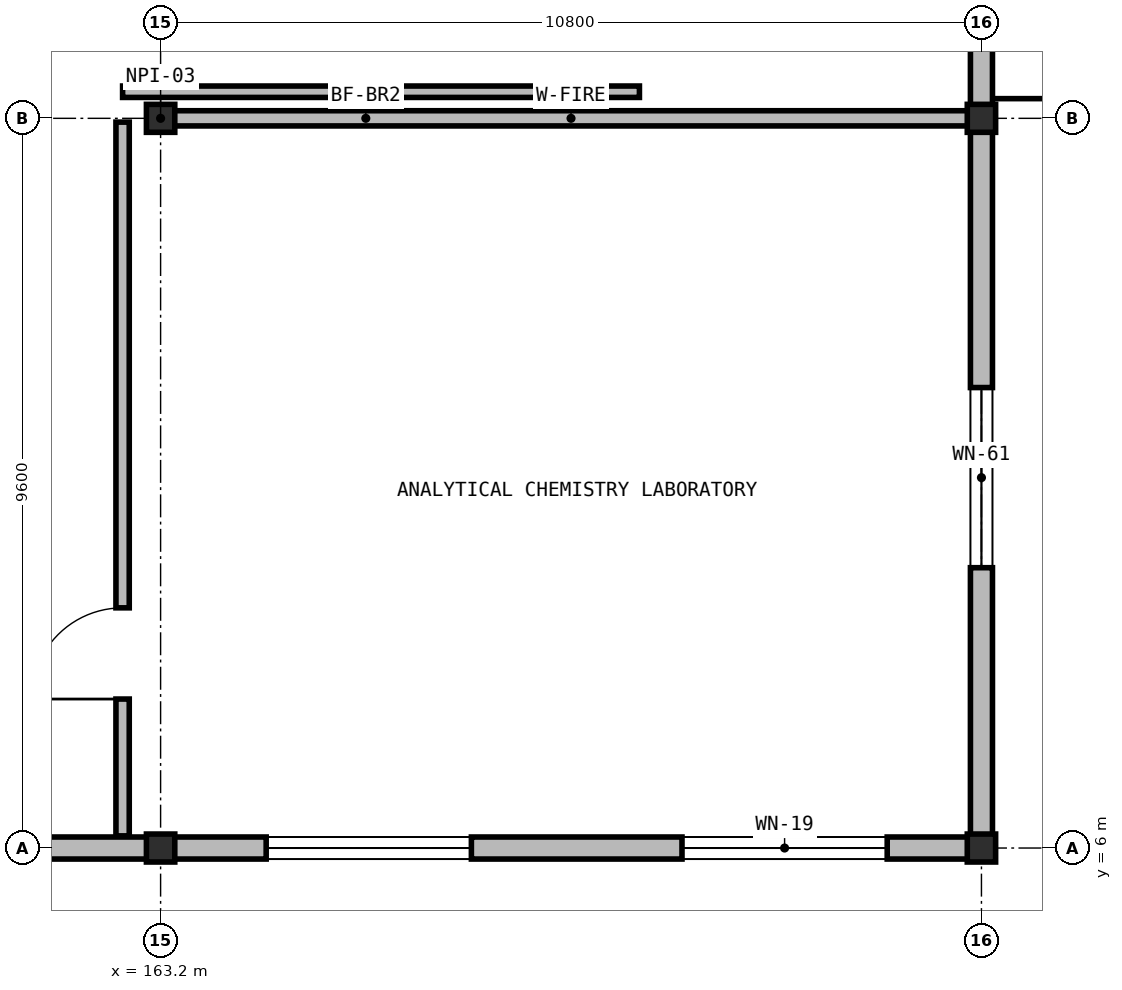
"""IFC4 building model, lengths in metres.
Left out: names, types, materials, properties, quantities, classifications, styles, units other than length and angle.
Written with IfcOpenShell. Run it as: python <this file> out.ifc"""

import sys

from ifc_helpers import new_model, si_unit, direction, frame, frame_2d, origin, origin_2d, place, context, subcontext, project, spatial, rectangle, i_section, extrude, element, fill, save


model = new_model("IFC4")
c1 = context("Model", 3, precision=1e-05, world=origin(), true_north=direction((0.0, 1.0)))
c2 = subcontext(c1, "Body", "Model", "MODEL_VIEW")
j1 = project(units=[si_unit("LENGTHUNIT", "METRE"), si_unit("PLANEANGLEUNIT", "RADIAN")], contexts=[c1])
p1 = place(None, origin())
s1 = spatial("IfcSite", under=j1, at=p1, CompositionType="ELEMENT")
p2 = place(p1, origin())
s2 = spatial("IfcBuilding", under=s1, at=p2, CompositionType="ELEMENT")
p3 = place(p2, frame((0.0, 0.0, 23.45)))
s3 = spatial("IfcBuildingStorey", under=s2, at=p3, CompositionType="ELEMENT", Elevation=23.45)
for number, where, z_axis, x_axis in (
    (1, (163.2, 6.0, 0.0), (0.0, 0.0, 1.0), (1.0, 0.0, 0.0)),
    (2, (163.2, 15.6, 0.0), (0.0, 0.0, 1.0), (1.0, 0.0, 0.0)),
    (3, (174.0, 6.0, 0.0), (0.0, 0.0, 1.0), (1.0, 0.0, 0.0)),
    (4, (174.0, 15.6, 0.0), (0.0, 0.0, 1.0), (1.0, 0.0, 0.0)),
):
    element("IfcColumn", number, at=place(p3, frame(where, z_axis=z_axis, x_axis=x_axis)), inside=s3, PredefinedType="COLUMN", context=c2, shape_type="SweptSolid", body=[
        extrude(i_section(OverallWidth=0.373, OverallDepth=0.368, WebThickness=0.017, FlangeThickness=0.027, at=origin_2d()), origin(), (0.0, 0.0, 1.0), 4.55),
    ])
p4 = place(p3, frame((174.0, 25.196, 0.0), z_axis=(0.0, 0.0, 1.0), x_axis=(0.0, -1.0, 0.0)))
e5 = element("IfcWall", 5, at=p4, inside=s3, PredefinedType="SOLIDWALL", context=c2, shape_type="SweptSolid", body=[
    extrude(rectangle(XDim=9.592, YDim=0.29, at=frame_2d((4.796, 0.0))), origin(), (0.0, 0.0, 1.0), 3.899),
])
p5 = place(p4, frame((3.776, 0.0, 0.95)))
e6 = element("IfcOpeningElement", 6, at=p5, cuts=e5, PredefinedType="OPENING", context=c2, shape_type="SweptSolid", body=[
    extrude(rectangle(XDim=2.04, YDim=1.56, at=frame_2d((1.02, 0.78))), frame((0.0, 0.155, 0.0), z_axis=(0.0, -1.0, 0.0), x_axis=(1.0, 0.0, 0.0)), (0.0, 0.0, 1.0), 0.31),
])
p6 = place(p3, frame((174.0, 15.596, 0.0), z_axis=(0.0, 0.0, 1.0), x_axis=(0.0, -1.0, 0.0)))
e7 = element("IfcWall", 7, at=p6, inside=s3, PredefinedType="SOLIDWALL", context=c2, shape_type="SweptSolid", body=[
    extrude(rectangle(XDim=9.447, YDim=0.29, at=frame_2d((4.724, 0.0))), origin(), (0.0, 0.0, 1.0), 3.899),
])
p7 = place(p6, frame((3.538, 0.0, 0.95)))
e8 = element("IfcOpeningElement", 8, at=p7, cuts=e7, PredefinedType="OPENING", context=c2, shape_type="SweptSolid", body=[
    extrude(rectangle(XDim=2.37, YDim=1.48, at=frame_2d((1.185, 0.74))), frame((0.0, 0.155, 0.0), z_axis=(0.0, -1.0, 0.0), x_axis=(1.0, 0.0, 0.0)), (0.0, 0.0, 1.0), 0.31),
])
p8 = place(p3, frame((174.145, 6.0, 0.0), z_axis=(0.0, 0.0, 1.0), x_axis=(-1.0, 0.0, 0.0)))
e9 = element("IfcWall", 9, at=p8, inside=s3, PredefinedType="SOLIDWALL", context=c2, shape_type="SweptSolid", body=[
    extrude(rectangle(XDim=10.941, YDim=0.29, at=frame_2d((5.47, 0.0))), origin(), (0.0, 0.0, 1.0), 3.831),
])
p9 = place(p8, frame((1.385, 0.0, 0.95)))
e10 = element("IfcOpeningElement", 10, at=p9, cuts=e9, PredefinedType="OPENING", context=c2, shape_type="SweptSolid", body=[
    extrude(rectangle(XDim=2.7, YDim=1.4, at=frame_2d((1.35, 0.7))), frame((0.0, 0.155, 0.0), z_axis=(0.0, -1.0, 0.0), x_axis=(1.0, 0.0, 0.0)), (0.0, 0.0, 1.0), 0.31),
])
p10 = place(p8, frame((6.856, 0.0, 0.95)))
e11 = element("IfcOpeningElement", 11, at=p10, cuts=e9, PredefinedType="OPENING", context=c2, shape_type="SweptSolid", body=[
    extrude(rectangle(XDim=2.7, YDim=1.4, at=frame_2d((1.35, 0.7))), frame((0.0, 0.155, 0.0), z_axis=(0.0, -1.0, 0.0), x_axis=(1.0, 0.0, 0.0)), (0.0, 0.0, 1.0), 0.31),
])
p11 = place(p3, frame((163.196, 6.0, 0.0), z_axis=(0.0, 0.0, 1.0), x_axis=(-1.0, 0.0, 0.0)))
e12 = element("IfcWall", 12, at=p11, inside=s3, PredefinedType="SOLIDWALL", context=c2, shape_type="SweptSolid", body=[
    extrude(rectangle(XDim=9.741, YDim=0.29, at=frame_2d((4.871, 0.0))), origin(), (0.0, 0.0, 1.0), 3.899),
])
p12 = place(p11, frame((6.506, 0.0, 0.95)))
e13 = element("IfcOpeningElement", 13, at=p12, cuts=e12, PredefinedType="OPENING", context=c2, shape_type="SweptSolid", body=[
    extrude(rectangle(XDim=1.6, YDim=1.72, at=frame_2d((0.8, 0.86))), frame((0.0, 0.155, 0.0), z_axis=(0.0, -1.0, 0.0), x_axis=(1.0, 0.0, 0.0)), (0.0, 0.0, 1.0), 0.31),
])
p13 = place(p3, frame((163.36, 15.6, 0.0), z_axis=(0.0, 0.0, 1.0), x_axis=(1.0, 0.0, 0.0)))
e14 = element("IfcWall", 14, at=p13, inside=s3, PredefinedType="SOLIDWALL", context=c2, shape_type="SweptSolid", body=[
    extrude(rectangle(XDim=10.48, YDim=0.2, at=frame_2d((5.24, 0.0))), origin(), (0.0, 0.0, 1.0), 3.754),
])
p14 = place(p3, frame((162.7, 6.16, 0.0), z_axis=(0.0, 0.0, 1.0), x_axis=(0.0, 1.0, 0.0)))
e15 = element("IfcWall", 15, at=p14, inside=s3, PredefinedType="PARTITIONING", context=c2, shape_type="SweptSolid", body=[
    extrude(rectangle(XDim=9.39, YDim=0.175, at=frame_2d((4.695, 0.0))), origin(), (0.0, 0.0, 1.0), 4.3),
])
p15 = place(p14, frame((1.8, 0.0, 0.0)))
e16 = element("IfcOpeningElement", 16, at=p15, cuts=e15, PredefinedType="OPENING", context=c2, shape_type="SweptSolid", body=[
    extrude(rectangle(XDim=1.2, YDim=2.2, at=frame_2d((0.6, 1.1))), frame((0.0, 0.097, 0.0), z_axis=(0.0, -1.0, 0.0), x_axis=(1.0, 0.0, 0.0)), (0.0, 0.0, 1.0), 0.195),
])
p16 = place(p3, frame((162.7, 15.95, 0.0), z_axis=(0.0, 0.0, 1.0), x_axis=(1.0, 0.0, 0.0)))
e17 = element("IfcWall", 17, at=p16, inside=s3, PredefinedType="PARTITIONING", context=c2, shape_type="SweptSolid", body=[
    extrude(rectangle(XDim=6.8, YDim=0.15, at=frame_2d((3.4, 0.0))), origin(), (0.0, 0.0, 1.0), 4.3),
])
p17 = place(p7, origin())
e18 = element("IfcWindow", 18, at=p17, inside=s3, PartitioningType="SINGLE_PANEL", PredefinedType="WINDOW", context=c2, shape_type="SweptSolid", body=[
    extrude(rectangle(XDim=2.37, YDim=1.48, at=frame_2d((1.185, 0.74))), frame((0.0, 0.03, 0.0), z_axis=(0.0, -1.0, 0.0), x_axis=(1.0, 0.0, 0.0)), (0.0, 0.0, 1.0), 0.06),
])
fill(e8, e18)
p18 = place(p9, origin())
e19 = element("IfcWindow", 19, at=p18, inside=s3, PartitioningType="SINGLE_PANEL", PredefinedType="WINDOW", context=c2, shape_type="SweptSolid", body=[
    extrude(rectangle(XDim=2.7, YDim=1.4, at=frame_2d((1.35, 0.7))), frame((0.0, 0.03, 0.0), z_axis=(0.0, -1.0, 0.0), x_axis=(1.0, 0.0, 0.0)), (0.0, 0.0, 1.0), 0.06),
])
fill(e10, e19)
p19 = place(p10, origin())
e20 = element("IfcWindow", 20, at=p19, inside=s3, PartitioningType="SINGLE_PANEL", PredefinedType="WINDOW", context=c2, shape_type="SweptSolid", body=[
    extrude(rectangle(XDim=2.7, YDim=1.4, at=frame_2d((1.35, 0.7))), frame((0.0, 0.03, 0.0), z_axis=(0.0, -1.0, 0.0), x_axis=(1.0, 0.0, 0.0)), (0.0, 0.0, 1.0), 0.06),
])
fill(e11, e20)
p20 = place(p15, origin())
e21 = element("IfcDoor", 21, at=p20, inside=s3, OperationType="SINGLE_SWING_LEFT", PredefinedType="DOOR", context=c2, shape_type="SweptSolid", body=[
    extrude(rectangle(XDim=1.2, YDim=2.2, at=frame_2d((0.6, 1.1))), frame((0.0, 0.025, 0.0), z_axis=(0.0, -1.0, 0.0), x_axis=(1.0, 0.0, 0.0)), (0.0, 0.0, 1.0), 0.05),
])
fill(e16, e21)
save(model, sys.argv[1])
